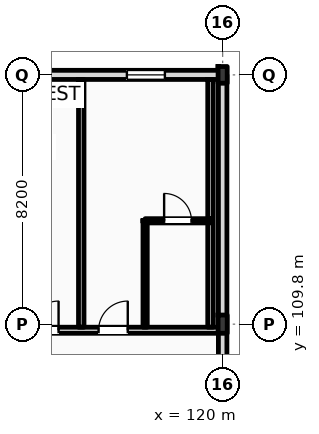
"""IFC4 building model, lengths in metres.
Left out: names, types, materials, properties, quantities, classifications, styles, units other than length and angle.
Written with IfcOpenShell. Run it as: python <this file> out.ifc"""

import sys

from ifc_helpers import new_model, si_unit, direction, frame, frame_2d, origin, origin_2d, place, context, subcontext, project, spatial, rectangle, i_section, extrude, element, fill, save


model = new_model("IFC4")
c1 = context("Model", 3, precision=1e-05, world=origin(), true_north=direction((0.0, 1.0)))
c2 = subcontext(c1, "Body", "Model", "MODEL_VIEW")
j1 = project(units=[si_unit("LENGTHUNIT", "METRE"), si_unit("PLANEANGLEUNIT", "RADIAN")], contexts=[c1])
p1 = place(None, origin())
s1 = spatial("IfcSite", under=j1, at=p1, CompositionType="ELEMENT")
p2 = place(p1, origin())
s2 = spatial("IfcBuilding", under=s1, at=p2, CompositionType="ELEMENT")
p3 = place(p2, frame((0.0, 0.0, 16.2)))
s3 = spatial("IfcBuildingStorey", under=s2, at=p3, CompositionType="ELEMENT", Elevation=16.2)
p4 = place(p3, frame((120.0, 109.8, 0.0), z_axis=(0.0, 0.0, 1.0), x_axis=(1.0, 0.0, 0.0)))
e1 = element("IfcColumn", 1, at=p4, inside=s3, PredefinedType="COLUMN", context=c2, shape_type="SweptSolid", body=[
    extrude(i_section(OverallWidth=0.3, OverallDepth=0.6, WebThickness=0.015, FlangeThickness=0.03, FilletRadius=0.027, at=origin_2d()), origin(), (0.0, 0.0, 1.0), 4.2),
])
p5 = place(p3, frame((120.0, 118.0, 0.0), z_axis=(0.0, 0.0, 1.0), x_axis=(1.0, 0.0, 0.0)))
e2 = element("IfcColumn", 2, at=p5, inside=s3, PredefinedType="COLUMN", context=c2, shape_type="SweptSolid", body=[
    extrude(i_section(OverallWidth=0.3, OverallDepth=0.55, WebThickness=0.015, FlangeThickness=0.029, FilletRadius=0.027, at=origin_2d()), origin(), (0.0, 0.0, 1.0), 4.2),
])
p6 = place(p3, frame((22.5, 118.0, 0.0), z_axis=(0.0, 0.0, 1.0), x_axis=(1.0, 0.0, 0.0)))
e3 = element("IfcWall", 3, at=p6, inside=s3, PredefinedType="STANDARD", context=c2, shape_type="SweptSolid", body=[
    extrude(rectangle(XDim=97.5, YDim=0.3, at=frame_2d((48.75, 0.0))), origin(), (0.0, 0.0, 1.0), 3.36),
])
p7 = place(p6, frame((3.721, 0.0, 0.9)))
e4 = element("IfcOpeningElement", 4, at=p7, cuts=e3, PredefinedType="OPENING", context=c2, shape_type="SweptSolid", body=[
    extrude(rectangle(XDim=0.9, YDim=1.8, at=frame_2d((0.45, 0.9))), frame((0.0, 0.16, 0.0), z_axis=(0.0, -1.0, 0.0), x_axis=(1.0, 0.0, 0.0)), (0.0, 0.0, 1.0), 0.32),
])
p8 = place(p6, frame((6.447, 0.0, 0.9)))
e5 = element("IfcOpeningElement", 5, at=p8, cuts=e3, PredefinedType="OPENING", context=c2, shape_type="SweptSolid", body=[
    extrude(rectangle(XDim=1.35, YDim=1.85, at=frame_2d((0.675, 0.925))), frame((0.0, 0.16, 0.0), z_axis=(0.0, -1.0, 0.0), x_axis=(1.0, 0.0, 0.0)), (0.0, 0.0, 1.0), 0.32),
])
p9 = place(p6, frame((11.363, 0.0, 0.9)))
e6 = element("IfcOpeningElement", 6, at=p9, cuts=e3, PredefinedType="OPENING", context=c2, shape_type="SweptSolid", body=[
    extrude(rectangle(XDim=1.5, YDim=1.9, at=frame_2d((0.75, 0.95))), frame((0.0, 0.16, 0.0), z_axis=(0.0, -1.0, 0.0), x_axis=(1.0, 0.0, 0.0)), (0.0, 0.0, 1.0), 0.32),
])
p10 = place(p6, frame((15.078, 0.0, 0.9)))
e7 = element("IfcOpeningElement", 7, at=p10, cuts=e3, PredefinedType="OPENING", context=c2, shape_type="SweptSolid", body=[
    extrude(rectangle(XDim=1.65, YDim=1.95, at=frame_2d((0.825, 0.975))), frame((0.0, 0.16, 0.0), z_axis=(0.0, -1.0, 0.0), x_axis=(1.0, 0.0, 0.0)), (0.0, 0.0, 1.0), 0.32),
])
p11 = place(p6, frame((19.395, 0.0, 0.9)))
e8 = element("IfcOpeningElement", 8, at=p11, cuts=e3, PredefinedType="OPENING", context=c2, shape_type="SweptSolid", body=[
    extrude(rectangle(XDim=1.8, YDim=2.0, at=frame_2d((0.9, 1.0))), frame((0.0, 0.16, 0.0), z_axis=(0.0, -1.0, 0.0), x_axis=(1.0, 0.0, 0.0)), (0.0, 0.0, 1.0), 0.32),
])
p12 = place(p6, frame((23.31, 0.0, 0.9)))
e9 = element("IfcOpeningElement", 9, at=p12, cuts=e3, PredefinedType="OPENING", context=c2, shape_type="SweptSolid", body=[
    extrude(rectangle(XDim=1.95, YDim=2.05, at=frame_2d((0.975, 1.025))), frame((0.0, 0.16, 0.0), z_axis=(0.0, -1.0, 0.0), x_axis=(1.0, 0.0, 0.0)), (0.0, 0.0, 1.0), 0.32),
])
p13 = place(p6, frame((28.026, 0.0, 0.9)))
e10 = element("IfcOpeningElement", 10, at=p13, cuts=e3, PredefinedType="OPENING", context=c2, shape_type="SweptSolid", body=[
    extrude(rectangle(XDim=2.1, YDim=2.1, at=frame_2d((1.05, 1.05))), frame((0.0, 0.16, 0.0), z_axis=(0.0, -1.0, 0.0), x_axis=(1.0, 0.0, 0.0)), (0.0, 0.0, 1.0), 0.32),
])
p14 = place(p6, frame((31.941, 0.0, 0.9)))
e11 = element("IfcOpeningElement", 11, at=p14, cuts=e3, PredefinedType="OPENING", context=c2, shape_type="SweptSolid", body=[
    extrude(rectangle(XDim=1.1, YDim=2.15, at=frame_2d((0.55, 1.075))), frame((0.0, 0.16, 0.0), z_axis=(0.0, -1.0, 0.0), x_axis=(1.0, 0.0, 0.0)), (0.0, 0.0, 1.0), 0.32),
])
p15 = place(p6, frame((36.657, 0.0, 0.9)))
e12 = element("IfcOpeningElement", 12, at=p15, cuts=e3, PredefinedType="OPENING", context=c2, shape_type="SweptSolid", body=[
    extrude(rectangle(XDim=2.4, YDim=2.2, at=frame_2d((1.2, 1.1))), frame((0.0, 0.16, 0.0), z_axis=(0.0, -1.0, 0.0), x_axis=(1.0, 0.0, 0.0)), (0.0, 0.0, 1.0), 0.32),
])
p16 = place(p6, frame((42.574, 0.0, 0.9)))
e13 = element("IfcOpeningElement", 13, at=p16, cuts=e3, PredefinedType="OPENING", context=c2, shape_type="SweptSolid", body=[
    extrude(rectangle(XDim=1.35, YDim=2.25, at=frame_2d((0.675, 1.125))), frame((0.0, 0.16, 0.0), z_axis=(0.0, -1.0, 0.0), x_axis=(1.0, 0.0, 0.0)), (0.0, 0.0, 1.0), 0.32),
])
p17 = place(p6, frame((45.289, 0.0, 0.9)))
e14 = element("IfcOpeningElement", 14, at=p17, cuts=e3, PredefinedType="OPENING", context=c2, shape_type="SweptSolid", body=[
    extrude(rectangle(XDim=2.7, YDim=2.28, at=frame_2d((1.35, 1.14))), frame((0.0, 0.16, 0.0), z_axis=(0.0, -1.0, 0.0), x_axis=(1.0, 0.0, 0.0)), (0.0, 0.0, 1.0), 0.32),
])
p18 = place(p6, frame((50.406, 0.0, 0.9)))
e15 = element("IfcOpeningElement", 15, at=p18, cuts=e3, PredefinedType="OPENING", context=c2, shape_type="SweptSolid", body=[
    extrude(rectangle(XDim=1.8, YDim=2.28, at=frame_2d((0.9, 1.14))), frame((0.0, 0.16, 0.0), z_axis=(0.0, -1.0, 0.0), x_axis=(1.0, 0.0, 0.0)), (0.0, 0.0, 1.0), 0.32),
])
p19 = place(p6, frame((53.922, 0.0, 0.9)))
e16 = element("IfcOpeningElement", 16, at=p19, cuts=e3, PredefinedType="OPENING", context=c2, shape_type="SweptSolid", body=[
    extrude(rectangle(XDim=1.8, YDim=2.28, at=frame_2d((0.9, 1.14))), frame((0.0, 0.16, 0.0), z_axis=(0.0, -1.0, 0.0), x_axis=(1.0, 0.0, 0.0)), (0.0, 0.0, 1.0), 0.32),
])
p20 = place(p6, frame((58.332, 0.0, 0.9)))
e17 = element("IfcOpeningElement", 17, at=p20, cuts=e3, PredefinedType="OPENING", context=c2, shape_type="SweptSolid", body=[
    extrude(rectangle(XDim=2.961, YDim=2.28, at=frame_2d((1.48, 1.14))), frame((0.0, 0.16, 0.0), z_axis=(0.0, -1.0, 0.0), x_axis=(1.0, 0.0, 0.0)), (0.0, 0.0, 1.0), 0.32),
])
p21 = place(p6, frame((62.513, 0.0, 0.9)))
e18 = element("IfcOpeningElement", 18, at=p21, cuts=e3, PredefinedType="OPENING", context=c2, shape_type="SweptSolid", body=[
    extrude(rectangle(XDim=1.8, YDim=2.28, at=frame_2d((0.9, 1.14))), frame((0.0, 0.16, 0.0), z_axis=(0.0, -1.0, 0.0), x_axis=(1.0, 0.0, 0.0)), (0.0, 0.0, 1.0), 0.32),
])
p22 = place(p6, frame((67.114, 0.0, 0.9)))
e19 = element("IfcOpeningElement", 19, at=p22, cuts=e3, PredefinedType="OPENING", context=c2, shape_type="SweptSolid", body=[
    extrude(rectangle(XDim=2.961, YDim=2.28, at=frame_2d((1.48, 1.14))), frame((0.0, 0.16, 0.0), z_axis=(0.0, -1.0, 0.0), x_axis=(1.0, 0.0, 0.0)), (0.0, 0.0, 1.0), 0.32),
])
p23 = place(p6, frame((73.695, 0.0, 0.9)))
e20 = element("IfcOpeningElement", 20, at=p23, cuts=e3, PredefinedType="OPENING", context=c2, shape_type="SweptSolid", body=[
    extrude(rectangle(XDim=1.1, YDim=2.28, at=frame_2d((0.55, 1.14))), frame((0.0, 0.16, 0.0), z_axis=(0.0, -1.0, 0.0), x_axis=(1.0, 0.0, 0.0)), (0.0, 0.0, 1.0), 0.32),
])
p24 = place(p6, frame((75.895, 0.0, 0.9)))
e21 = element("IfcOpeningElement", 21, at=p24, cuts=e3, PredefinedType="OPENING", context=c2, shape_type="SweptSolid", body=[
    extrude(rectangle(XDim=2.961, YDim=2.28, at=frame_2d((1.48, 1.14))), frame((0.0, 0.16, 0.0), z_axis=(0.0, -1.0, 0.0), x_axis=(1.0, 0.0, 0.0)), (0.0, 0.0, 1.0), 0.32),
])
p25 = place(p6, frame((81.676, 0.0, 0.9)))
e22 = element("IfcOpeningElement", 22, at=p25, cuts=e3, PredefinedType="OPENING", context=c2, shape_type="SweptSolid", body=[
    extrude(rectangle(XDim=1.8, YDim=2.28, at=frame_2d((0.9, 1.14))), frame((0.0, 0.16, 0.0), z_axis=(0.0, -1.0, 0.0), x_axis=(1.0, 0.0, 0.0)), (0.0, 0.0, 1.0), 0.32),
])
p26 = place(p6, frame((84.677, 0.0, 0.9)))
e23 = element("IfcOpeningElement", 23, at=p26, cuts=e3, PredefinedType="OPENING", context=c2, shape_type="SweptSolid", body=[
    extrude(rectangle(XDim=2.961, YDim=2.28, at=frame_2d((1.48, 1.14))), frame((0.0, 0.16, 0.0), z_axis=(0.0, -1.0, 0.0), x_axis=(1.0, 0.0, 0.0)), (0.0, 0.0, 1.0), 0.32),
])
p27 = place(p6, frame((89.999, 0.0, 0.9)))
e24 = element("IfcOpeningElement", 24, at=p27, cuts=e3, PredefinedType="OPENING", context=c2, shape_type="SweptSolid", body=[
    extrude(rectangle(XDim=1.1, YDim=1.5, at=frame_2d((0.55, 0.75))), frame((0.0, 0.16, 0.0), z_axis=(0.0, -1.0, 0.0), x_axis=(1.0, 0.0, 0.0)), (0.0, 0.0, 1.0), 0.32),
])
p28 = place(p6, frame((94.35, 0.0, 0.9)))
e25 = element("IfcOpeningElement", 25, at=p28, cuts=e3, PredefinedType="OPENING", context=c2, shape_type="SweptSolid", body=[
    extrude(rectangle(XDim=1.25, YDim=1.6, at=frame_2d((0.625, 0.8))), frame((0.0, 0.16, 0.0), z_axis=(0.0, -1.0, 0.0), x_axis=(1.0, 0.0, 0.0)), (0.0, 0.0, 1.0), 0.32),
])
p29 = place(p3, frame((120.0, 96.0, 0.0), z_axis=(0.0, 0.0, 1.0), x_axis=(0.0, 1.0, 0.0)))
e26 = element("IfcWall", 26, at=p29, inside=s3, PredefinedType="STANDARD", context=c2, shape_type="SweptSolid", body=[
    extrude(rectangle(XDim=22.0, YDim=0.28, at=frame_2d((11.0, 0.0))), origin(), (0.0, 0.0, 1.0), 3.51),
])
p30 = place(p3, frame((10.65, 109.6, 0.0), z_axis=(0.0, 0.0, 1.0), x_axis=(1.0, 0.0, 0.0)))
e27 = element("IfcWall", 27, at=p30, inside=s3, PredefinedType="PARTITIONING", context=c2, shape_type="SweptSolid", body=[
    extrude(rectangle(XDim=109.21, YDim=0.2, at=frame_2d((54.605, 0.0))), origin(), (0.0, 0.0, 1.0), 3.36),
])
p31 = place(p30, frame((15.43, 0.0, 0.0)))
e28 = element("IfcOpeningElement", 28, at=p31, cuts=e27, PredefinedType="OPENING", context=c2, shape_type="SweptSolid", body=[
    extrude(rectangle(XDim=1.02, YDim=2.2, at=frame_2d((0.51, 1.1))), frame((0.0, 0.11, 0.0), z_axis=(0.0, -1.0, 0.0), x_axis=(1.0, 0.0, 0.0)), (0.0, 0.0, 1.0), 0.22),
])
p32 = place(p30, frame((19.537, 0.0, 0.0)))
e29 = element("IfcOpeningElement", 29, at=p32, cuts=e27, PredefinedType="OPENING", context=c2, shape_type="SweptSolid", body=[
    extrude(rectangle(XDim=1.02, YDim=2.2, at=frame_2d((0.51, 1.1))), frame((0.0, 0.11, 0.0), z_axis=(0.0, -1.0, 0.0), x_axis=(1.0, 0.0, 0.0)), (0.0, 0.0, 1.0), 0.22),
])
p33 = place(p30, frame((23.928, 0.0, 0.0)))
e30 = element("IfcOpeningElement", 30, at=p33, cuts=e27, PredefinedType="OPENING", context=c2, shape_type="SweptSolid", body=[
    extrude(rectangle(XDim=1.02, YDim=2.2, at=frame_2d((0.51, 1.1))), frame((0.0, 0.11, 0.0), z_axis=(0.0, -1.0, 0.0), x_axis=(1.0, 0.0, 0.0)), (0.0, 0.0, 1.0), 0.22),
])
p34 = place(p30, frame((26.169, 0.0, 0.0)))
e31 = element("IfcOpeningElement", 31, at=p34, cuts=e27, PredefinedType="OPENING", context=c2, shape_type="SweptSolid", body=[
    extrude(rectangle(XDim=1.02, YDim=2.2, at=frame_2d((0.51, 1.1))), frame((0.0, 0.11, 0.0), z_axis=(0.0, -1.0, 0.0), x_axis=(1.0, 0.0, 0.0)), (0.0, 0.0, 1.0), 0.22),
])
p35 = place(p30, frame((32.739, 0.0, 0.0)))
e32 = element("IfcOpeningElement", 32, at=p35, cuts=e27, PredefinedType="OPENING", context=c2, shape_type="SweptSolid", body=[
    extrude(rectangle(XDim=0.96, YDim=2.2, at=frame_2d((0.48, 1.1))), frame((0.0, 0.11, 0.0), z_axis=(0.0, -1.0, 0.0), x_axis=(1.0, 0.0, 0.0)), (0.0, 0.0, 1.0), 0.22),
])
p36 = place(p30, frame((34.98, 0.0, 0.0)))
e33 = element("IfcOpeningElement", 33, at=p36, cuts=e27, PredefinedType="OPENING", context=c2, shape_type="SweptSolid", body=[
    extrude(rectangle(XDim=0.96, YDim=2.2, at=frame_2d((0.48, 1.1))), frame((0.0, 0.11, 0.0), z_axis=(0.0, -1.0, 0.0), x_axis=(1.0, 0.0, 0.0)), (0.0, 0.0, 1.0), 0.22),
])
p37 = place(p30, frame((41.521, 0.0, 0.0)))
e34 = element("IfcOpeningElement", 34, at=p37, cuts=e27, PredefinedType="OPENING", context=c2, shape_type="SweptSolid", body=[
    extrude(rectangle(XDim=0.96, YDim=2.2, at=frame_2d((0.48, 1.1))), frame((0.0, 0.11, 0.0), z_axis=(0.0, -1.0, 0.0), x_axis=(1.0, 0.0, 0.0)), (0.0, 0.0, 1.0), 0.22),
])
p38 = place(p30, frame((43.512, 0.0, 0.0)))
e35 = element("IfcOpeningElement", 35, at=p38, cuts=e27, PredefinedType="OPENING", context=c2, shape_type="SweptSolid", body=[
    extrude(rectangle(XDim=0.96, YDim=2.2, at=frame_2d((0.48, 1.1))), frame((0.0, 0.11, 0.0), z_axis=(0.0, -1.0, 0.0), x_axis=(1.0, 0.0, 0.0)), (0.0, 0.0, 1.0), 0.22),
])
p39 = place(p30, frame((50.303, 0.0, 0.0)))
e36 = element("IfcOpeningElement", 36, at=p39, cuts=e27, PredefinedType="OPENING", context=c2, shape_type="SweptSolid", body=[
    extrude(rectangle(XDim=0.96, YDim=2.2, at=frame_2d((0.48, 1.1))), frame((0.0, 0.11, 0.0), z_axis=(0.0, -1.0, 0.0), x_axis=(1.0, 0.0, 0.0)), (0.0, 0.0, 1.0), 0.22),
])
p40 = place(p30, frame((54.944, 0.0, 0.0)))
e37 = element("IfcOpeningElement", 37, at=p40, cuts=e27, PredefinedType="OPENING", context=c2, shape_type="SweptSolid", body=[
    extrude(rectangle(XDim=0.96, YDim=2.2, at=frame_2d((0.48, 1.1))), frame((0.0, 0.11, 0.0), z_axis=(0.0, -1.0, 0.0), x_axis=(1.0, 0.0, 0.0)), (0.0, 0.0, 1.0), 0.22),
])
p41 = place(p30, frame((59.085, 0.0, 0.0)))
e38 = element("IfcOpeningElement", 38, at=p41, cuts=e27, PredefinedType="OPENING", context=c2, shape_type="SweptSolid", body=[
    extrude(rectangle(XDim=0.96, YDim=2.2, at=frame_2d((0.48, 1.1))), frame((0.0, 0.11, 0.0), z_axis=(0.0, -1.0, 0.0), x_axis=(1.0, 0.0, 0.0)), (0.0, 0.0, 1.0), 0.22),
])
p42 = place(p30, frame((63.476, 0.0, 0.0)))
e39 = element("IfcOpeningElement", 39, at=p42, cuts=e27, PredefinedType="OPENING", context=c2, shape_type="SweptSolid", body=[
    extrude(rectangle(XDim=0.96, YDim=2.2, at=frame_2d((0.48, 1.1))), frame((0.0, 0.11, 0.0), z_axis=(0.0, -1.0, 0.0), x_axis=(1.0, 0.0, 0.0)), (0.0, 0.0, 1.0), 0.22),
])
p43 = place(p30, frame((65.716, 0.0, 0.0)))
e40 = element("IfcOpeningElement", 40, at=p43, cuts=e27, PredefinedType="OPENING", context=c2, shape_type="SweptSolid", body=[
    extrude(rectangle(XDim=0.96, YDim=2.2, at=frame_2d((0.48, 1.1))), frame((0.0, 0.11, 0.0), z_axis=(0.0, -1.0, 0.0), x_axis=(1.0, 0.0, 0.0)), (0.0, 0.0, 1.0), 0.22),
])
p44 = place(p30, frame((72.257, 0.0, 0.0)))
e41 = element("IfcOpeningElement", 41, at=p44, cuts=e27, PredefinedType="OPENING", context=c2, shape_type="SweptSolid", body=[
    extrude(rectangle(XDim=0.96, YDim=2.2, at=frame_2d((0.48, 1.1))), frame((0.0, 0.11, 0.0), z_axis=(0.0, -1.0, 0.0), x_axis=(1.0, 0.0, 0.0)), (0.0, 0.0, 1.0), 0.22),
])
p45 = place(p30, frame((74.498, 0.0, 0.0)))
e42 = element("IfcOpeningElement", 42, at=p45, cuts=e27, PredefinedType="OPENING", context=c2, shape_type="SweptSolid", body=[
    extrude(rectangle(XDim=0.96, YDim=2.2, at=frame_2d((0.48, 1.1))), frame((0.0, 0.11, 0.0), z_axis=(0.0, -1.0, 0.0), x_axis=(1.0, 0.0, 0.0)), (0.0, 0.0, 1.0), 0.22),
])
p46 = place(p30, frame((81.039, 0.0, 0.0)))
e43 = element("IfcOpeningElement", 43, at=p46, cuts=e27, PredefinedType="OPENING", context=c2, shape_type="SweptSolid", body=[
    extrude(rectangle(XDim=0.96, YDim=2.2, at=frame_2d((0.48, 1.1))), frame((0.0, 0.11, 0.0), z_axis=(0.0, -1.0, 0.0), x_axis=(1.0, 0.0, 0.0)), (0.0, 0.0, 1.0), 0.22),
])
p47 = place(p30, frame((85.68, 0.0, 0.0)))
e44 = element("IfcOpeningElement", 44, at=p47, cuts=e27, PredefinedType="OPENING", context=c2, shape_type="SweptSolid", body=[
    extrude(rectangle(XDim=0.96, YDim=2.2, at=frame_2d((0.48, 1.1))), frame((0.0, 0.11, 0.0), z_axis=(0.0, -1.0, 0.0), x_axis=(1.0, 0.0, 0.0)), (0.0, 0.0, 1.0), 0.22),
])
p48 = place(p30, frame((89.82, 0.0, 0.0)))
e45 = element("IfcOpeningElement", 45, at=p48, cuts=e27, PredefinedType="OPENING", context=c2, shape_type="SweptSolid", body=[
    extrude(rectangle(XDim=0.96, YDim=2.2, at=frame_2d((0.48, 1.1))), frame((0.0, 0.11, 0.0), z_axis=(0.0, -1.0, 0.0), x_axis=(1.0, 0.0, 0.0)), (0.0, 0.0, 1.0), 0.22),
])
p49 = place(p30, frame((94.211, 0.0, 0.0)))
e46 = element("IfcOpeningElement", 46, at=p49, cuts=e27, PredefinedType="OPENING", context=c2, shape_type="SweptSolid", body=[
    extrude(rectangle(XDim=0.96, YDim=2.2, at=frame_2d((0.48, 1.1))), frame((0.0, 0.11, 0.0), z_axis=(0.0, -1.0, 0.0), x_axis=(1.0, 0.0, 0.0)), (0.0, 0.0, 1.0), 0.22),
])
p50 = place(p30, frame((98.602, 0.0, 0.0)))
e47 = element("IfcOpeningElement", 47, at=p50, cuts=e27, PredefinedType="OPENING", context=c2, shape_type="SweptSolid", body=[
    extrude(rectangle(XDim=0.96, YDim=2.2, at=frame_2d((0.48, 1.1))), frame((0.0, 0.11, 0.0), z_axis=(0.0, -1.0, 0.0), x_axis=(1.0, 0.0, 0.0)), (0.0, 0.0, 1.0), 0.22),
])
p51 = place(p30, frame((102.993, 0.0, 0.0)))
e48 = element("IfcOpeningElement", 48, at=p51, cuts=e27, PredefinedType="OPENING", context=c2, shape_type="SweptSolid", body=[
    extrude(rectangle(XDim=0.96, YDim=2.2, at=frame_2d((0.48, 1.1))), frame((0.0, 0.11, 0.0), z_axis=(0.0, -1.0, 0.0), x_axis=(1.0, 0.0, 0.0)), (0.0, 0.0, 1.0), 0.22),
])
p52 = place(p30, frame((105.269, 0.0, 0.0)))
e49 = element("IfcOpeningElement", 49, at=p52, cuts=e27, PredefinedType="OPENING", context=c2, shape_type="SweptSolid", body=[
    extrude(rectangle(XDim=0.96, YDim=2.2, at=frame_2d((0.48, 1.1))), frame((0.0, 0.11, 0.0), z_axis=(0.0, -1.0, 0.0), x_axis=(1.0, 0.0, 0.0)), (0.0, 0.0, 1.0), 0.22),
])
p53 = place(p30, frame((2.716, 0.0, 0.0)))
e50 = element("IfcOpeningElement", 50, at=p53, cuts=e27, PredefinedType="OPENING", context=c2, shape_type="SweptSolid", body=[
    extrude(rectangle(XDim=1.35, YDim=2.25, at=frame_2d((0.675, 1.125))), frame((0.0, 0.11, 0.0), z_axis=(0.0, -1.0, 0.0), x_axis=(1.0, 0.0, 0.0)), (0.0, 0.0, 1.0), 0.22),
])
p54 = place(p30, frame((6.65, 0.0, 0.0)))
e51 = element("IfcOpeningElement", 51, at=p54, cuts=e27, PredefinedType="OPENING", context=c2, shape_type="SweptSolid", body=[
    extrude(rectangle(XDim=1.35, YDim=2.25, at=frame_2d((0.675, 1.125))), frame((0.0, 0.11, 0.0), z_axis=(0.0, -1.0, 0.0), x_axis=(1.0, 0.0, 0.0)), (0.0, 0.0, 1.0), 0.22),
])
p55 = place(p30, frame((10.583, 0.0, 0.0)))
e52 = element("IfcOpeningElement", 52, at=p55, cuts=e27, PredefinedType="OPENING", context=c2, shape_type="SweptSolid", body=[
    extrude(rectangle(XDim=1.35, YDim=2.25, at=frame_2d((0.675, 1.125))), frame((0.0, 0.11, 0.0), z_axis=(0.0, -1.0, 0.0), x_axis=(1.0, 0.0, 0.0)), (0.0, 0.0, 1.0), 0.22),
])
for number, where, z_axis, x_axis in (
    (53, (115.349, 109.7, 0.0), (0.0, 0.0, 1.0), (0.0, 1.0, 0.0)),
    (54, (119.6, 109.7, 0.0), (0.0, 0.0, 1.0), (0.0, 1.0, 0.0)),
):
    element("IfcWall", number, at=place(p3, frame(where, z_axis=z_axis, x_axis=x_axis)), inside=s3, PredefinedType="PARTITIONING", context=c2, shape_type="SweptSolid", body=[
        extrude(rectangle(XDim=8.15, YDim=0.18, at=frame_2d((4.075, 0.0))), origin(), (0.0, 0.0, 1.0), 3.92),
    ])
p56 = place(p3, frame((117.45, 109.7, 0.0), z_axis=(0.0, 0.0, 1.0), x_axis=(0.0, 1.0, 0.0)))
e55 = element("IfcWall", 55, at=p56, inside=s3, PredefinedType="PARTITIONING", context=c2, shape_type="SweptSolid", body=[
    extrude(rectangle(XDim=3.5, YDim=0.14, at=frame_2d((1.75, 0.0))), origin(), (0.0, 0.0, 1.0), 3.92),
])
p57 = place(p3, frame((117.45, 113.2, 0.0), z_axis=(0.0, 0.0, 1.0), x_axis=(1.0, 0.0, 0.0)))
e56 = element("IfcWall", 56, at=p57, inside=s3, PredefinedType="PARTITIONING", context=c2, shape_type="SweptSolid", body=[
    extrude(rectangle(XDim=2.15, YDim=0.14, at=frame_2d((1.075, 0.0))), origin(), (0.0, 0.0, 1.0), 3.92),
])
p58 = place(p57, frame((0.625, 0.0, 0.0)))
e57 = element("IfcOpeningElement", 57, at=p58, cuts=e56, PredefinedType="OPENING", context=c2, shape_type="SweptSolid", body=[
    extrude(rectangle(XDim=0.9, YDim=2.1, at=frame_2d((0.45, 1.05))), frame((0.0, 0.08, 0.0), z_axis=(0.0, -1.0, 0.0), x_axis=(1.0, 0.0, 0.0)), (0.0, 0.0, 1.0), 0.16),
])
p59 = place(p28, origin())
e58 = element("IfcWindow", 58, at=p59, inside=s3, PartitioningType="DOUBLE_PANEL_VERTICAL", PredefinedType="WINDOW", context=c2, shape_type="SweptSolid", body=[
    extrude(rectangle(XDim=1.25, YDim=1.6, at=frame_2d((0.625, 0.8))), frame((0.0, 0.03, 0.0), z_axis=(0.0, -1.0, 0.0), x_axis=(1.0, 0.0, 0.0)), (0.0, 0.0, 1.0), 0.06),
])
fill(e25, e58)
p60 = place(p51, origin())
e59 = element("IfcDoor", 59, at=p60, inside=s3, OperationType="SINGLE_SWING_RIGHT", PredefinedType="DOOR", context=c2, shape_type="SweptSolid", body=[
    extrude(rectangle(XDim=0.96, YDim=2.2, at=frame_2d((0.48, 1.1))), frame((0.0, 0.025, 0.0), z_axis=(0.0, -1.0, 0.0), x_axis=(1.0, 0.0, 0.0)), (0.0, 0.0, 1.0), 0.05),
])
fill(e48, e59)
p61 = place(p52, origin())
e60 = element("IfcDoor", 60, at=p61, inside=s3, OperationType="SINGLE_SWING_RIGHT", PredefinedType="DOOR", context=c2, shape_type="SweptSolid", body=[
    extrude(rectangle(XDim=0.96, YDim=2.2, at=frame_2d((0.48, 1.1))), frame((0.0, 0.025, 0.0), z_axis=(0.0, -1.0, 0.0), x_axis=(1.0, 0.0, 0.0)), (0.0, 0.0, 1.0), 0.05),
])
fill(e49, e60)
p62 = place(p58, origin())
e61 = element("IfcDoor", 61, at=p62, inside=s3, OperationType="SINGLE_SWING_LEFT", PredefinedType="DOOR", context=c2, shape_type="SweptSolid", body=[
    extrude(rectangle(XDim=0.9, YDim=2.1, at=frame_2d((0.45, 1.05))), frame((0.0, 0.025, 0.0), z_axis=(0.0, -1.0, 0.0), x_axis=(1.0, 0.0, 0.0)), (0.0, 0.0, 1.0), 0.05),
])
fill(e57, e61)
save(model, sys.argv[1])
